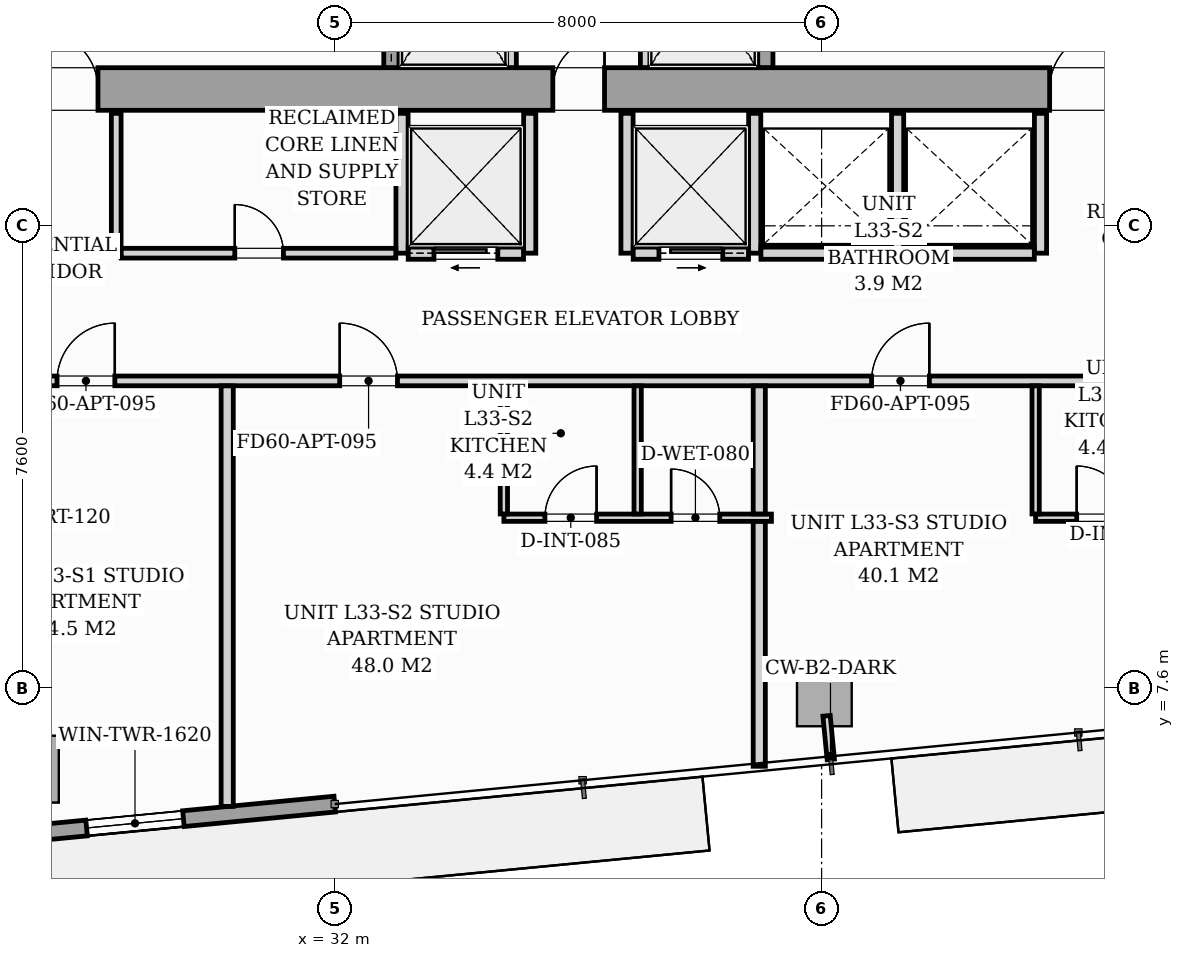
"""IFC4 building model, lengths in metres.
Left out: names, types, materials, properties, quantities, classifications, styles, units other than length and angle.
Written with IfcOpenShell. Run it as: python <this file> out.ifc"""

import sys

from ifc_helpers import new_model, si_unit, direction, frame, frame_2d, origin, origin_2d, place, context, subcontext, project, spatial, rectangle, i_section, extrude, source, transform, mapped, element, fill, save


model = new_model("IFC4")
c1 = context("Model", 3, precision=1e-05, world=origin(), true_north=direction((0.0, 1.0)))
c2 = subcontext(c1, "Body", "Model", "MODEL_VIEW")
j1 = project(units=[si_unit("LENGTHUNIT", "METRE"), si_unit("PLANEANGLEUNIT", "RADIAN")], contexts=[c1])
p1 = place(None, origin())
s1 = spatial("IfcSite", under=j1, at=p1, CompositionType="ELEMENT")
p2 = place(p1, origin())
s2 = spatial("IfcBuilding", under=s1, at=p2, CompositionType="ELEMENT")
p3 = place(p2, frame((0.0, 0.0, 116.2)))
s3 = spatial("IfcBuildingStorey", under=s2, at=p3, CompositionType="ELEMENT", Elevation=116.2)
m1 = source(origin(), c2, "Body", "SweptSolid", [
    extrude(i_section(OverallWidth=0.427, OverallDepth=0.483, WebThickness=0.051, FlangeThickness=0.082, FilletRadius=0.018, at=origin_2d()), origin(), (0.0, 0.0, 1.0), 3.196),
])
for number, where, z_axis, x_axis in (
    (1, (33.12, 17.4, 0.002), (0.0, 0.0, 1.0), (1.0, 0.0, 0.0)),
    (2, (38.88, 17.4, 0.002), (0.0, 0.0, 1.0), (1.0, 0.0, 0.0)),
):
    element("IfcColumn", number, at=place(p3, frame(where, z_axis=z_axis, x_axis=x_axis)), inside=s3, PredefinedType="PILASTER", context=c2, shape_type="MappedRepresentation", body=[
        mapped(m1, transform((0.0, 0.0, 0.0), scale=1.0)),
    ])
m2 = source(origin(), c2, "Body", "SweptSolid", [
    extrude(rectangle(XDim=0.9, YDim=1.1, at=origin_2d()), origin(), (0.0, 0.0, 1.0), 3.194),
])
for number, where, z_axis, x_axis in (
    (3, (27.006, 6.265, 0.002), (0.0, 0.0, 1.0), (0.995, 0.096, 0.0)),
    (4, (40.045, 7.521, 0.002), (0.0, 0.0, 1.0), (0.995, 0.096, 0.0)),
):
    element("IfcColumn", number, at=place(p3, frame(where, z_axis=z_axis, x_axis=x_axis)), inside=s3, PredefinedType="COLUMN", context=c2, shape_type="MappedRepresentation", body=[
        mapped(m2, transform((0.0, 0.0, 0.0), scale=1.0)),
    ])
p4 = place(p3, frame((31.994, 5.69, 0.0), z_axis=(0.0, 0.0, 1.0), x_axis=(-0.995396521236, -0.095842399342, 0.0)))
e5 = element("IfcWall", 5, at=p4, inside=s3, PredefinedType="STANDARD", context=c2, shape_type="SweptSolid", body=[
    extrude(rectangle(XDim=19.11, YDim=0.26, at=frame_2d((9.555, 0.0))), origin(), (0.0, 0.0, 1.0), 2.9),
])
p5 = place(p4, frame((7.63, 0.0, 0.0)))
e6 = element("IfcOpeningElement", 6, at=p5, cuts=e5, PredefinedType="OPENING", context=c2, shape_type="SweptSolid", body=[
    extrude(rectangle(XDim=1.8, YDim=2.06, at=frame_2d((0.9, 1.03))), frame((0.0, 0.14, 0.0), z_axis=(0.0, -1.0, 0.0), x_axis=(1.0, 0.0, 0.0)), (0.0, 0.0, 1.0), 0.28),
])
p6 = place(p4, frame((2.5, 0.0, 0.65)))
e7 = element("IfcOpeningElement", 7, at=p6, cuts=e5, PredefinedType="OPENING", context=c2, shape_type="SweptSolid", body=[
    extrude(rectangle(XDim=1.6, YDim=1.5, at=frame_2d((0.8, 0.75))), frame((0.0, 0.14, 0.0), z_axis=(0.0, -1.0, 0.0), x_axis=(1.0, 0.0, 0.0)), (0.0, 0.0, 1.0), 0.28),
])
p7 = place(p3, frame((26.1, 17.45, 0.0), z_axis=(0.0, 0.0, 1.0), x_axis=(1.0, 0.0, 0.0)))
e8 = element("IfcWall", 8, at=p7, inside=s3, PredefinedType="SHEAR", context=c2, shape_type="SweptSolid", body=[
    extrude(rectangle(XDim=19.8, YDim=0.7, at=frame_2d((9.9, 0.0))), origin(), (0.0, 0.0, 1.0), 3.2),
])
p8 = place(p7, frame((1.05, 0.0, 0.0)))
e9 = element("IfcOpeningElement", 9, at=p8, cuts=e8, PredefinedType="OPENING", context=c2, shape_type="SweptSolid", body=[
    extrude(rectangle(XDim=0.95, YDim=2.06, at=frame_2d((0.475, 1.03))), frame((0.0, 0.36, 0.0), z_axis=(0.0, -1.0, 0.0), x_axis=(1.0, 0.0, 0.0)), (0.0, 0.0, 1.0), 0.72),
])
p9 = place(p7, frame((9.48, 0.0, 0.0)))
e10 = element("IfcOpeningElement", 10, at=p9, cuts=e8, PredefinedType="OPENING", context=c2, shape_type="SweptSolid", body=[
    extrude(rectangle(XDim=0.85, YDim=2.0, at=frame_2d((0.425, 1.0))), frame((0.0, 0.36, 0.0), z_axis=(0.0, -1.0, 0.0), x_axis=(1.0, 0.0, 0.0)), (0.0, 0.0, 1.0), 0.72),
])
p10 = place(p7, frame((17.65, 0.0, 0.0)))
e11 = element("IfcOpeningElement", 11, at=p10, cuts=e8, PredefinedType="OPENING", context=c2, shape_type="SweptSolid", body=[
    extrude(rectangle(XDim=0.95, YDim=2.06, at=frame_2d((0.475, 1.03))), frame((0.0, 0.36, 0.0), z_axis=(0.0, -1.0, 0.0), x_axis=(1.0, 0.0, 0.0)), (0.0, 0.0, 1.0), 0.72),
])
p11 = place(p3, frame((32.925, 17.802, 0.0), z_axis=(0.0, 0.0, 1.0), x_axis=(0.0, 1.0, 0.0)))
e12 = element("IfcWall", 12, at=p11, inside=s3, PredefinedType="SOLIDWALL", context=c2, shape_type="SweptSolid", body=[
    extrude(rectangle(XDim=2.646, YDim=0.25, at=frame_2d((1.323, 0.0))), origin(), (0.0, 0.0, 1.0), 3.2),
])
p12 = place(p11, frame((0.598, 0.0, 0.0)))
e13 = element("IfcOpeningElement", 13, at=p12, cuts=e12, PredefinedType="OPENING", context=c2, shape_type="SweptSolid", body=[
    extrude(rectangle(XDim=1.1, YDim=2.08, at=frame_2d((0.55, 1.04))), frame((0.0, 0.135, 0.0), z_axis=(0.0, -1.0, 0.0), x_axis=(1.0, 0.0, 0.0)), (0.0, 0.0, 1.0), 0.27),
])
for number, where, z_axis, x_axis in (
    (14, (34.9, 17.802, 0.0), (0.0, 0.0, 1.0), (0.0, 1.0, 0.0)),
    (15, (37.1, 17.802, 0.0), (0.0, 0.0, 1.0), (0.0, 1.0, 0.0)),
):
    element("IfcWall", number, at=place(p3, frame(where, z_axis=z_axis, x_axis=x_axis)), inside=s3, PredefinedType="PARTITIONING", context=c2, shape_type="SweptSolid", body=[
        extrude(rectangle(XDim=2.646, YDim=0.16, at=frame_2d((1.323, 0.0))), origin(), (0.0, 0.0, 1.0), 2.9),
    ])
p13 = place(p3, frame((39.075, 17.802, 0.0), z_axis=(0.0, 0.0, 1.0), x_axis=(0.0, 1.0, 0.0)))
e16 = element("IfcWall", 16, at=p13, inside=s3, PredefinedType="SOLIDWALL", context=c2, shape_type="SweptSolid", body=[
    extrude(rectangle(XDim=2.646, YDim=0.25, at=frame_2d((1.323, 0.0))), origin(), (0.0, 0.0, 1.0), 3.2),
])
p14 = place(p13, frame((0.598, 0.0, 0.0)))
e17 = element("IfcOpeningElement", 17, at=p14, cuts=e16, PredefinedType="OPENING", context=c2, shape_type="SweptSolid", body=[
    extrude(rectangle(XDim=1.1, YDim=2.08, at=frame_2d((0.55, 1.04))), frame((0.0, 0.135, 0.0), z_axis=(0.0, -1.0, 0.0), x_axis=(1.0, 0.0, 0.0)), (0.0, 0.0, 1.0), 0.27),
])
p15 = place(p3, frame((28.4, 14.75, 0.0), z_axis=(0.0, 0.0, 1.0), x_axis=(0.0, 1.0, 0.0)))
e18 = element("IfcWall", 18, at=p15, inside=s3, PredefinedType="PARTITIONING", context=c2, shape_type="SweptSolid", body=[
    extrude(rectangle(XDim=2.3, YDim=0.16, at=frame_2d((1.15, 0.0))), origin(), (0.0, 0.0, 1.0), 2.9),
])
p16 = place(p3, frame((33.1, 14.75, 0.0), z_axis=(0.0, 0.0, 1.0), x_axis=(0.0, 1.0, 0.0)))
e19 = element("IfcWall", 19, at=p16, inside=s3, PredefinedType="PARTITIONING", context=c2, shape_type="SweptSolid", body=[
    extrude(rectangle(XDim=2.3, YDim=0.2, at=frame_2d((1.15, 0.0))), origin(), (0.0, 0.0, 1.0), 2.9),
])
p17 = place(p3, frame((28.482, 14.75, 0.0), z_axis=(0.0, 0.0, 1.0), x_axis=(1.0, 0.0, 0.0)))
e20 = element("IfcWall", 20, at=p17, inside=s3, PredefinedType="PARTITIONING", context=c2, shape_type="SweptSolid", body=[
    extrude(rectangle(XDim=4.516, YDim=0.16, at=frame_2d((2.258, 0.0))), origin(), (0.0, 0.0, 1.0), 2.9),
])
p18 = place(p17, frame((1.868, 0.0, 0.0)))
e21 = element("IfcOpeningElement", 21, at=p18, cuts=e20, PredefinedType="OPENING", context=c2, shape_type="SweptSolid", body=[
    extrude(rectangle(XDim=0.8, YDim=2.05, at=frame_2d((0.4, 1.025))), frame((0.0, 0.09, 0.0), z_axis=(0.0, -1.0, 0.0), x_axis=(1.0, 0.0, 0.0)), (0.0, 0.0, 1.0), 0.18),
])
p19 = place(p3, frame((35.2, 14.75, 0.0), z_axis=(0.0, 0.0, 1.0), x_axis=(0.0, 1.0, 0.0)))
e22 = element("IfcWall", 22, at=p19, inside=s3, PredefinedType="PARTITIONING", context=c2, shape_type="SweptSolid", body=[
    extrude(rectangle(XDim=2.3, YDim=0.2, at=frame_2d((1.15, 0.0))), origin(), (0.0, 0.0, 1.0), 2.9),
])
p20 = place(p3, frame((33.202, 14.75, 0.0), z_axis=(0.0, 0.0, 1.0), x_axis=(1.0, 0.0, 0.0)))
e23 = element("IfcWall", 23, at=p20, inside=s3, PredefinedType="PARTITIONING", context=c2, shape_type="SweptSolid", body=[
    extrude(rectangle(XDim=1.896, YDim=0.2, at=frame_2d((0.948, 0.0))), origin(), (0.0, 0.0, 1.0), 2.9),
])
p21 = place(p20, frame((0.423, 0.0, 0.0)))
e24 = element("IfcOpeningElement", 24, at=p21, cuts=e23, PredefinedType="OPENING", context=c2, shape_type="SweptSolid", body=[
    extrude(rectangle(XDim=1.05, YDim=2.08, at=frame_2d((0.525, 1.04))), frame((0.0, 0.11, 0.0), z_axis=(0.0, -1.0, 0.0), x_axis=(1.0, 0.0, 0.0)), (0.0, 0.0, 1.0), 0.22),
])
for number, where, z_axis, x_axis in (
    (25, (36.8, 14.75, 0.0), (0.0, 0.0, 1.0), (0.0, 1.0, 0.0)),
    (26, (38.9, 14.75, 0.0), (0.0, 0.0, 1.0), (0.0, 1.0, 0.0)),
):
    element("IfcWall", number, at=place(p3, frame(where, z_axis=z_axis, x_axis=x_axis)), inside=s3, PredefinedType="PARTITIONING", context=c2, shape_type="SweptSolid", body=[
        extrude(rectangle(XDim=2.3, YDim=0.2, at=frame_2d((1.15, 0.0))), origin(), (0.0, 0.0, 1.0), 2.9),
    ])
p22 = place(p3, frame((36.902, 14.75, 0.0), z_axis=(0.0, 0.0, 1.0), x_axis=(1.0, 0.0, 0.0)))
e27 = element("IfcWall", 27, at=p22, inside=s3, PredefinedType="PARTITIONING", context=c2, shape_type="SweptSolid", body=[
    extrude(rectangle(XDim=1.896, YDim=0.2, at=frame_2d((0.948, 0.0))), origin(), (0.0, 0.0, 1.0), 2.9),
])
p23 = place(p22, frame((0.423, 0.0, 0.0)))
e28 = element("IfcOpeningElement", 28, at=p23, cuts=e27, PredefinedType="OPENING", context=c2, shape_type="SweptSolid", body=[
    extrude(rectangle(XDim=1.05, YDim=2.08, at=frame_2d((0.525, 1.04))), frame((0.0, 0.11, 0.0), z_axis=(0.0, -1.0, 0.0), x_axis=(1.0, 0.0, 0.0)), (0.0, 0.0, 1.0), 0.22),
])
for number, where, z_axis, x_axis in (
    (29, (41.25, 14.75, 0.0), (0.0, 0.0, 1.0), (0.0, 1.0, 0.0)),
    (30, (43.6, 14.75, 0.0), (0.0, 0.0, 1.0), (0.0, 1.0, 0.0)),
):
    element("IfcWall", number, at=place(p3, frame(where, z_axis=z_axis, x_axis=x_axis)), inside=s3, PredefinedType="PARTITIONING", context=c2, shape_type="SweptSolid", body=[
        extrude(rectangle(XDim=2.3, YDim=0.2, at=frame_2d((1.15, 0.0))), origin(), (0.0, 0.0, 1.0), 2.9),
    ])
for number, where, z_axis, x_axis in (
    (31, (39.002, 14.75, 0.0), (0.0, 0.0, 1.0), (1.0, 0.0, 0.0)),
    (32, (41.352, 14.75, 0.0), (0.0, 0.0, 1.0), (1.0, 0.0, 0.0)),
):
    element("IfcWall", number, at=place(p3, frame(where, z_axis=z_axis, x_axis=x_axis)), inside=s3, PredefinedType="PARTITIONING", context=c2, shape_type="SweptSolid", body=[
        extrude(rectangle(XDim=2.146, YDim=0.2, at=frame_2d((1.073, 0.0))), origin(), (0.0, 0.0, 1.0), 2.9),
    ])
p24 = place(p3, frame((21.5, 12.65, 0.0), z_axis=(0.0, 0.0, 1.0), x_axis=(1.0, 0.0, 0.0)))
e33 = element("IfcWall", 33, at=p24, inside=s3, PredefinedType="PARTITIONING", context=c2, shape_type="SweptSolid", body=[
    extrude(rectangle(XDim=26.2, YDim=0.16, at=frame_2d((13.1, 0.0))), origin(), (0.0, 0.0, 1.0), 2.9),
])
p25 = place(p24, frame((5.927, 0.0, 0.0)))
e34 = element("IfcOpeningElement", 34, at=p25, cuts=e33, PredefinedType="OPENING", context=c2, shape_type="SweptSolid", body=[
    extrude(rectangle(XDim=0.95, YDim=2.06, at=frame_2d((0.475, 1.03))), frame((0.0, 0.09, 0.0), z_axis=(0.0, -1.0, 0.0), x_axis=(1.0, 0.0, 0.0)), (0.0, 0.0, 1.0), 0.18),
])
p26 = place(p24, frame((10.575, 0.0, 0.0)))
e35 = element("IfcOpeningElement", 35, at=p26, cuts=e33, PredefinedType="OPENING", context=c2, shape_type="SweptSolid", body=[
    extrude(rectangle(XDim=0.95, YDim=2.06, at=frame_2d((0.475, 1.03))), frame((0.0, 0.09, 0.0), z_axis=(0.0, -1.0, 0.0), x_axis=(1.0, 0.0, 0.0)), (0.0, 0.0, 1.0), 0.18),
])
p27 = place(p24, frame((19.322, 0.0, 0.0)))
e36 = element("IfcOpeningElement", 36, at=p27, cuts=e33, PredefinedType="OPENING", context=c2, shape_type="SweptSolid", body=[
    extrude(rectangle(XDim=0.95, YDim=2.06, at=frame_2d((0.475, 1.03))), frame((0.0, 0.09, 0.0), z_axis=(0.0, -1.0, 0.0), x_axis=(1.0, 0.0, 0.0)), (0.0, 0.0, 1.0), 0.18),
])
p28 = place(p3, frame((30.225, 5.653, 0.0), z_axis=(0.0, 0.0, 1.0), x_axis=(0.0, 1.0, 0.0)))
e37 = element("IfcWall", 37, at=p28, inside=s3, PredefinedType="PARTITIONING", context=c2, shape_type="SweptSolid", body=[
    extrude(rectangle(XDim=6.916, YDim=0.2, at=frame_2d((3.458, 0.0))), origin(), (0.0, 0.0, 1.0), 2.9),
])
p29 = place(p3, frame((34.775, 10.4, 0.0), z_axis=(0.0, 0.0, 1.0), x_axis=(1.0, 0.0, 0.0)))
e38 = element("IfcWall", 38, at=p29, inside=s3, PredefinedType="PARTITIONING", context=c2, shape_type="SweptSolid", body=[
    extrude(rectangle(XDim=4.4, YDim=0.12, at=frame_2d((2.2, 0.0))), origin(), (0.0, 0.0, 1.0), 2.9),
])
p30 = place(p29, frame((0.675, 0.0, 0.0)))
e39 = element("IfcOpeningElement", 39, at=p30, cuts=e38, PredefinedType="OPENING", context=c2, shape_type="SweptSolid", body=[
    extrude(rectangle(XDim=0.85, YDim=2.05, at=frame_2d((0.425, 1.025))), frame((0.0, 0.07, 0.0), z_axis=(0.0, -1.0, 0.0), x_axis=(1.0, 0.0, 0.0)), (0.0, 0.0, 1.0), 0.14),
])
p31 = place(p29, frame((2.75, 0.0, 0.0)))
e40 = element("IfcOpeningElement", 40, at=p31, cuts=e38, PredefinedType="OPENING", context=c2, shape_type="SweptSolid", body=[
    extrude(rectangle(XDim=0.8, YDim=2.02, at=frame_2d((0.4, 1.01))), frame((0.0, 0.07, 0.0), z_axis=(0.0, -1.0, 0.0), x_axis=(1.0, 0.0, 0.0)), (0.0, 0.0, 1.0), 0.14),
])
for number, where, z_axis, x_axis in (
    (41, (34.775, 10.462, 0.0), (0.0, 0.0, 1.0), (0.0, 1.0, 0.0)),
    (42, (36.975, 10.462, 0.0), (0.0, 0.0, 1.0), (0.0, 1.0, 0.0)),
):
    element("IfcWall", number, at=place(p3, frame(where, z_axis=z_axis, x_axis=x_axis)), inside=s3, PredefinedType="PARTITIONING", context=c2, shape_type="SweptSolid", body=[
        extrude(rectangle(XDim=2.106, YDim=0.12, at=frame_2d((1.053, 0.0))), origin(), (0.0, 0.0, 1.0), 2.9),
    ])
p32 = place(p3, frame((38.975, 6.312, 0.0), z_axis=(0.0, 0.0, 1.0), x_axis=(0.0, 1.0, 0.0)))
e43 = element("IfcWall", 43, at=p32, inside=s3, PredefinedType="PARTITIONING", context=c2, shape_type="SweptSolid", body=[
    extrude(rectangle(XDim=4.025, YDim=0.2, at=frame_2d((2.013, 0.0))), origin(), (0.0, 0.0, 1.0), 2.9),
])
p33 = place(p3, frame((38.975, 10.462, 0.0), z_axis=(0.0, 0.0, 1.0), x_axis=(0.0, 1.0, 0.0)))
e44 = element("IfcWall", 44, at=p33, inside=s3, PredefinedType="PARTITIONING", context=c2, shape_type="SweptSolid", body=[
    extrude(rectangle(XDim=2.106, YDim=0.2, at=frame_2d((1.053, 0.0))), origin(), (0.0, 0.0, 1.0), 2.9),
])
p34 = place(p3, frame((43.52, 10.4, 0.0), z_axis=(0.0, 0.0, 1.0), x_axis=(1.0, 0.0, 0.0)))
e45 = element("IfcWall", 45, at=p34, inside=s3, PredefinedType="PARTITIONING", context=c2, shape_type="SweptSolid", body=[
    extrude(rectangle(XDim=4.098, YDim=0.12, at=frame_2d((2.049, 0.0))), origin(), (0.0, 0.0, 1.0), 2.9),
])
p35 = place(p34, frame((0.675, 0.0, 0.0)))
e46 = element("IfcOpeningElement", 46, at=p35, cuts=e45, PredefinedType="OPENING", context=c2, shape_type="SweptSolid", body=[
    extrude(rectangle(XDim=0.85, YDim=2.05, at=frame_2d((0.425, 1.025))), frame((0.0, 0.07, 0.0), z_axis=(0.0, -1.0, 0.0), x_axis=(1.0, 0.0, 0.0)), (0.0, 0.0, 1.0), 0.14),
])
p36 = place(p34, frame((2.75, 0.0, 0.0)))
e47 = element("IfcOpeningElement", 47, at=p36, cuts=e45, PredefinedType="OPENING", context=c2, shape_type="SweptSolid", body=[
    extrude(rectangle(XDim=0.8, YDim=2.02, at=frame_2d((0.4, 1.01))), frame((0.0, 0.07, 0.0), z_axis=(0.0, -1.0, 0.0), x_axis=(1.0, 0.0, 0.0)), (0.0, 0.0, 1.0), 0.14),
])
p37 = place(p3, frame((43.52, 10.462, 0.0), z_axis=(0.0, 0.0, 1.0), x_axis=(0.0, 1.0, 0.0)))
e48 = element("IfcWall", 48, at=p37, inside=s3, PredefinedType="PARTITIONING", context=c2, shape_type="SweptSolid", body=[
    extrude(rectangle(XDim=2.106, YDim=0.12, at=frame_2d((1.053, 0.0))), origin(), (0.0, 0.0, 1.0), 2.9),
])
p38 = place(p3, frame((40.082, 7.142, 0.0), z_axis=(0.0, 0.0, 1.0), x_axis=(0.095944965663, -0.995386640238, 0.0)))
e49 = element("IfcWall", 49, at=p38, inside=s3, PredefinedType="PARTITIONING", context=c2, shape_type="SweptSolid", body=[
    extrude(rectangle(XDim=0.72, YDim=0.12, at=frame_2d((0.36, 0.0))), origin(), (0.0, 0.0, 1.0), 2.9),
])
m3 = source(origin(), c2, "Body", "SweptSolid", [
    extrude(rectangle(XDim=1.6, YDim=1.5, at=frame_2d((0.8, 0.75))), frame((0.0, 0.03, 0.0), z_axis=(0.0, -1.0, 0.0), x_axis=(1.0, 0.0, 0.0)), (0.0, 0.0, 1.0), 0.06),
])
p39 = place(p6, origin())
e50 = element("IfcWindow", 50, at=p39, inside=s3, PartitioningType="SINGLE_PANEL", PredefinedType="WINDOW", context=c2, shape_type="MappedRepresentation", body=[
    mapped(m3, transform((0.0, 0.0, 0.0), scale=1.0)),
])
fill(e7, e50)
m4 = source(origin(), c2, "Body", "SweptSolid", [
    extrude(rectangle(XDim=0.95, YDim=2.06, at=frame_2d((0.475, 1.03))), frame((0.0, 0.025, 0.0), z_axis=(0.0, -1.0, 0.0), x_axis=(1.0, 0.0, 0.0)), (0.0, 0.0, 1.0), 0.05),
])
p40 = place(p8, origin())
e51 = element("IfcDoor", 51, at=p40, inside=s3, OperationType="SINGLE_SWING_LEFT", PredefinedType="DOOR", context=c2, shape_type="MappedRepresentation", body=[
    mapped(m4, transform((0.0, 0.0, 0.0), scale=1.0)),
])
fill(e9, e51)
m5 = source(origin(), c2, "Body", "SweptSolid", [
    extrude(rectangle(XDim=0.85, YDim=2.0, at=frame_2d((0.425, 1.0))), frame((0.0, 0.025, 0.0), z_axis=(0.0, -1.0, 0.0), x_axis=(1.0, 0.0, 0.0)), (0.0, 0.0, 1.0), 0.05),
])
p41 = place(p9, origin())
e52 = element("IfcDoor", 52, at=p41, inside=s3, OperationType="SINGLE_SWING_RIGHT", PredefinedType="DOOR", context=c2, shape_type="MappedRepresentation", body=[
    mapped(m5, transform((0.0, 0.0, 0.0), scale=1.0)),
])
fill(e10, e52)
p42 = place(p10, origin())
e53 = element("IfcDoor", 53, at=p42, inside=s3, OperationType="SINGLE_SWING_RIGHT", PredefinedType="DOOR", context=c2, shape_type="MappedRepresentation", body=[
    mapped(m4, transform((0.0, 0.0, 0.0), scale=1.0)),
])
fill(e11, e53)
m6 = source(origin(), c2, "Body", "SweptSolid", [
    extrude(rectangle(XDim=0.8, YDim=2.05, at=frame_2d((0.4, 1.025))), frame((0.0, 0.025, 0.0), z_axis=(0.0, -1.0, 0.0), x_axis=(1.0, 0.0, 0.0)), (0.0, 0.0, 1.0), 0.05),
])
p43 = place(p18, origin())
e54 = element("IfcDoor", 54, at=p43, inside=s3, OperationType="SINGLE_SWING_LEFT", PredefinedType="DOOR", context=c2, shape_type="MappedRepresentation", body=[
    mapped(m6, transform((0.0, 0.0, 0.0), scale=1.0)),
])
fill(e21, e54)
m7 = source(origin(), c2, "Body", "SweptSolid", [
    extrude(rectangle(XDim=1.05, YDim=2.08, at=frame_2d((0.525, 1.04))), frame((0.0, 0.025, 0.0), z_axis=(0.0, -1.0, 0.0), x_axis=(1.0, 0.0, 0.0)), (0.0, 0.0, 1.0), 0.05),
])
p44 = place(p21, origin())
e55 = element("IfcDoor", 55, at=p44, inside=s3, OperationType="SLIDING_TO_LEFT", PredefinedType="DOOR", context=c2, shape_type="MappedRepresentation", body=[
    mapped(m7, transform((0.0, 0.0, 0.0), scale=1.0)),
])
fill(e24, e55)
p45 = place(p23, origin())
e56 = element("IfcDoor", 56, at=p45, inside=s3, OperationType="SLIDING_TO_RIGHT", PredefinedType="DOOR", context=c2, shape_type="MappedRepresentation", body=[
    mapped(m7, transform((0.0, 0.0, 0.0), scale=1.0)),
])
fill(e28, e56)
m8 = source(origin(), c2, "Body", "SweptSolid", [
    extrude(rectangle(XDim=0.95, YDim=2.06, at=frame_2d((0.475, 1.03))), frame((0.0, 0.025, 0.0), z_axis=(0.0, -1.0, 0.0), x_axis=(1.0, 0.0, 0.0)), (0.0, 0.0, 1.0), 0.05),
])
p46 = place(p25, origin())
e57 = element("IfcDoor", 57, at=p46, inside=s3, OperationType="SINGLE_SWING_RIGHT", PredefinedType="DOOR", context=c2, shape_type="MappedRepresentation", body=[
    mapped(m8, transform((0.0, 0.0, 0.0), scale=1.0)),
])
fill(e34, e57)
p47 = place(p26, origin())
e58 = element("IfcDoor", 58, at=p47, inside=s3, OperationType="SINGLE_SWING_LEFT", PredefinedType="DOOR", context=c2, shape_type="MappedRepresentation", body=[
    mapped(m8, transform((0.0, 0.0, 0.0), scale=1.0)),
])
fill(e35, e58)
m9 = source(origin(), c2, "Body", "SweptSolid", [
    extrude(rectangle(XDim=0.85, YDim=2.05, at=frame_2d((0.425, 1.025))), frame((0.0, 0.025, 0.0), z_axis=(0.0, -1.0, 0.0), x_axis=(1.0, 0.0, 0.0)), (0.0, 0.0, 1.0), 0.05),
])
p48 = place(p30, origin())
e59 = element("IfcDoor", 59, at=p48, inside=s3, OperationType="SINGLE_SWING_RIGHT", PredefinedType="DOOR", context=c2, shape_type="MappedRepresentation", body=[
    mapped(m9, transform((0.0, 0.0, 0.0), scale=1.0)),
])
fill(e39, e59)
m10 = source(origin(), c2, "Body", "SweptSolid", [
    extrude(rectangle(XDim=0.8, YDim=2.02, at=frame_2d((0.4, 1.01))), frame((0.0, 0.025, 0.0), z_axis=(0.0, -1.0, 0.0), x_axis=(1.0, 0.0, 0.0)), (0.0, 0.0, 1.0), 0.05),
])
p49 = place(p31, origin())
e60 = element("IfcDoor", 60, at=p49, inside=s3, OperationType="SINGLE_SWING_LEFT", PredefinedType="DOOR", context=c2, shape_type="MappedRepresentation", body=[
    mapped(m10, transform((0.0, 0.0, 0.0), scale=1.0)),
])
fill(e40, e60)
p50 = place(p27, origin())
e61 = element("IfcDoor", 61, at=p50, inside=s3, OperationType="SINGLE_SWING_RIGHT", PredefinedType="DOOR", context=c2, shape_type="MappedRepresentation", body=[
    mapped(m8, transform((0.0, 0.0, 0.0), scale=1.0)),
])
fill(e36, e61)
p51 = place(p35, origin())
e62 = element("IfcDoor", 62, at=p51, inside=s3, OperationType="SINGLE_SWING_LEFT", PredefinedType="DOOR", context=c2, shape_type="MappedRepresentation", body=[
    mapped(m9, transform((0.0, 0.0, 0.0), scale=1.0)),
])
fill(e46, e62)
save(model, sys.argv[1])
